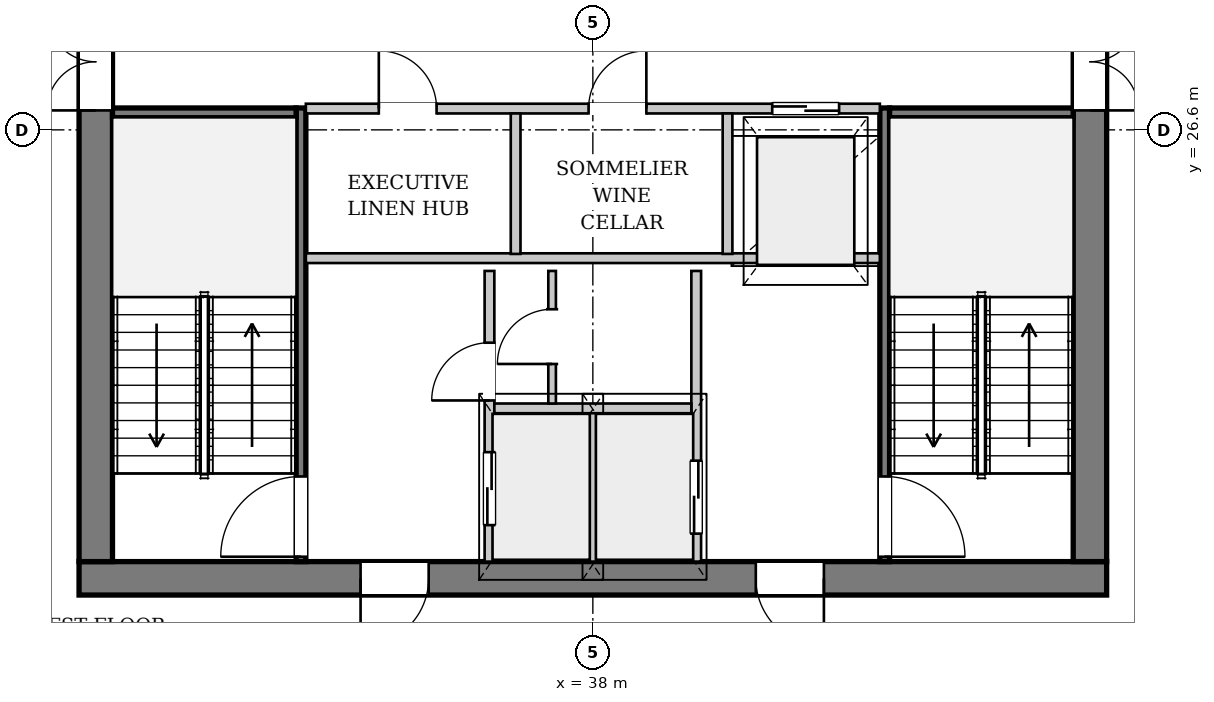
"""IFC4 building model, lengths in metres.
Left out: names, types, materials, properties, quantities, classifications, styles, units other than length and angle.
Written with IfcOpenShell. Run it as: python <this file> out.ifc"""

import sys

from ifc_helpers import new_model, si_unit, direction, frame, frame_2d, origin, place, context, subcontext, project, spatial, rectangle, extrude, source, transform, mapped, element, fill, save


model = new_model("IFC4")
c1 = context("Model", 3, precision=1e-05, world=origin(), true_north=direction((0.0, 1.0)))
c2 = subcontext(c1, "Body", "Model", "MODEL_VIEW")
j1 = project(units=[si_unit("LENGTHUNIT", "METRE"), si_unit("PLANEANGLEUNIT", "RADIAN")], contexts=[c1])
p1 = place(None, origin())
s1 = spatial("IfcSite", under=j1, at=p1, CompositionType="ELEMENT")
p2 = place(p1, origin())
s2 = spatial("IfcBuilding", under=s1, at=p2, CompositionType="ELEMENT")
p3 = place(p2, frame((0.0, 0.0, 178.55)))
s3 = spatial("IfcBuildingStorey", under=s2, at=p3, CompositionType="ELEMENT", Elevation=178.55)
p4 = place(p3, frame((53.023, 21.021, 0.0), z_axis=(0.0, 0.0, 1.0), x_axis=(-0.61594757216, -0.787787146601, 0.0)))
e1 = element("IfcWall", 1, at=p4, inside=s3, PredefinedType="SOLIDWALL", context=c2, shape_type="SweptSolid", body=[
    extrude(rectangle(XDim=23.347, YDim=0.32, at=frame_2d((11.674, 0.0))), origin(), (0.0, 0.0, 1.0), 2.722),
])
p5 = place(p4, frame((6.271, 0.0, 0.0)))
e2 = element("IfcOpeningElement", 2, at=p5, cuts=e1, PredefinedType="OPENING", context=c2, shape_type="SweptSolid", body=[
    extrude(rectangle(XDim=1.5, YDim=2.3, at=frame_2d((0.75, 1.15))), frame((0.0, 0.17, 0.0), z_axis=(0.0, -1.0, 0.0), x_axis=(1.0, 0.0, 0.0)), (0.0, 0.0, 1.0), 0.34),
])
p6 = place(p4, frame((15.977, 0.0, 0.252)))
e3 = element("IfcOpeningElement", 3, at=p6, cuts=e1, PredefinedType="OPENING", context=c2, shape_type="SweptSolid", body=[
    extrude(rectangle(XDim=2.6, YDim=2.35, at=frame_2d((1.3, 1.175))), frame((0.0, 0.17, 0.0), z_axis=(0.0, -1.0, 0.0), x_axis=(1.0, 0.0, 0.0)), (0.0, 0.0, 1.0), 0.34),
])
p7 = place(p3, frame((46.45, 19.225, 0.0), z_axis=(0.0, 0.0, 1.0), x_axis=(-1.0, 0.0, 0.0)))
e4 = element("IfcWall", 4, at=p7, inside=s3, PredefinedType="SHEAR", context=c2, shape_type="SweptSolid", body=[
    extrude(rectangle(XDim=16.9, YDim=0.55, at=frame_2d((8.45, 0.0))), origin(), (0.0, 0.0, 1.0), 3.33),
])
p8 = place(p7, frame((4.65, 0.0, 0.0)))
e5 = element("IfcOpeningElement", 5, at=p8, cuts=e4, PredefinedType="OPENING", context=c2, shape_type="SweptSolid", body=[
    extrude(rectangle(XDim=1.12, YDim=2.25, at=frame_2d((0.56, 1.125))), frame((0.0, 0.285, 0.0), z_axis=(0.0, -1.0, 0.0), x_axis=(1.0, 0.0, 0.0)), (0.0, 0.0, 1.0), 0.57),
])
p9 = place(p7, frame((11.15, 0.0, 0.0)))
e6 = element("IfcOpeningElement", 6, at=p9, cuts=e4, PredefinedType="OPENING", context=c2, shape_type="SweptSolid", body=[
    extrude(rectangle(XDim=1.12, YDim=2.25, at=frame_2d((0.56, 1.125))), frame((0.0, 0.285, 0.0), z_axis=(0.0, -1.0, 0.0), x_axis=(1.0, 0.0, 0.0)), (0.0, 0.0, 1.0), 0.57),
])
p10 = place(p3, frame((29.825, 19.5, 0.0), z_axis=(0.0, 0.0, 1.0), x_axis=(0.0, 1.0, 0.0)))
e7 = element("IfcWall", 7, at=p10, inside=s3, PredefinedType="SHEAR", context=c2, shape_type="SweptSolid", body=[
    extrude(rectangle(XDim=14.2, YDim=0.55, at=frame_2d((7.1, 0.0))), origin(), (0.0, 0.0, 1.0), 3.33),
])
p11 = place(p10, frame((7.42, 0.0, 0.0)))
e8 = element("IfcOpeningElement", 8, at=p11, cuts=e7, PredefinedType="OPENING", context=c2, shape_type="SweptSolid", body=[
    extrude(rectangle(XDim=1.6, YDim=2.2, at=frame_2d((0.8, 1.1))), frame((0.0, 0.285, 0.0), z_axis=(0.0, -1.0, 0.0), x_axis=(1.0, 0.0, 0.0)), (0.0, 0.0, 1.0), 0.57),
])
p12 = place(p3, frame((46.175, 33.7, 0.0), z_axis=(0.0, 0.0, 1.0), x_axis=(0.0, -1.0, 0.0)))
e9 = element("IfcWall", 9, at=p12, inside=s3, PredefinedType="SHEAR", context=c2, shape_type="SweptSolid", body=[
    extrude(rectangle(XDim=14.2, YDim=0.55, at=frame_2d((7.1, 0.0))), origin(), (0.0, 0.0, 1.0), 3.33),
])
p13 = place(p12, frame((5.18, 0.0, 0.0)))
e10 = element("IfcOpeningElement", 10, at=p13, cuts=e9, PredefinedType="OPENING", context=c2, shape_type="SweptSolid", body=[
    extrude(rectangle(XDim=1.6, YDim=2.2, at=frame_2d((0.8, 1.1))), frame((0.0, 0.285, 0.0), z_axis=(0.0, -1.0, 0.0), x_axis=(1.0, 0.0, 0.0)), (0.0, 0.0, 1.0), 0.57),
])
p14 = place(p12, frame((2.05, 0.0, 0.0)))
e11 = element("IfcOpeningElement", 11, at=p14, cuts=e9, PredefinedType="OPENING", context=c2, shape_type="SweptSolid", body=[
    extrude(rectangle(XDim=0.95, YDim=2.1, at=frame_2d((0.475, 1.05))), frame((0.0, 0.285, 0.0), z_axis=(0.0, -1.0, 0.0), x_axis=(1.0, 0.0, 0.0)), (0.0, 0.0, 1.0), 0.57),
])
p15 = place(p3, frame((33.2, 19.5, 0.0), z_axis=(0.0, 0.0, 1.0), x_axis=(0.0, 1.0, 0.0)))
e12 = element("IfcWall", 12, at=p15, inside=s3, PredefinedType="PARTITIONING", context=c2, shape_type="SweptSolid", body=[
    extrude(rectangle(XDim=7.46, YDim=0.16, at=frame_2d((3.73, 0.0))), origin(), (0.0, 0.0, 1.0), 3.33),
])
p16 = place(p15, frame((0.08, 0.0, 0.0)))
e13 = element("IfcOpeningElement", 13, at=p16, cuts=e12, PredefinedType="OPENING", context=c2, shape_type="SweptSolid", body=[
    extrude(rectangle(XDim=1.32, YDim=2.2, at=frame_2d((0.66, 1.1))), frame((0.0, 0.09, 0.0), z_axis=(0.0, -1.0, 0.0), x_axis=(1.0, 0.0, 0.0)), (0.0, 0.0, 1.0), 0.18),
])
p17 = place(p3, frame((30.1, 26.88, 0.0), z_axis=(0.0, 0.0, 1.0), x_axis=(1.0, 0.0, 0.0)))
e14 = element("IfcWall", 14, at=p17, inside=s3, PredefinedType="PARTITIONING", context=c2, shape_type="SweptSolid", body=[
    extrude(rectangle(XDim=3.02, YDim=0.16, at=frame_2d((1.51, 0.0))), origin(), (0.0, 0.0, 1.0), 3.33),
])
p18 = place(p3, frame((42.8, 26.96, 0.0), z_axis=(0.0, 0.0, 1.0), x_axis=(0.0, -1.0, 0.0)))
e15 = element("IfcWall", 15, at=p18, inside=s3, PredefinedType="PARTITIONING", context=c2, shape_type="SweptSolid", body=[
    extrude(rectangle(XDim=7.46, YDim=0.16, at=frame_2d((3.73, 0.0))), origin(), (0.0, 0.0, 1.0), 3.33),
])
p19 = place(p18, frame((6.06, 0.0, 0.0)))
e16 = element("IfcOpeningElement", 16, at=p19, cuts=e15, PredefinedType="OPENING", context=c2, shape_type="SweptSolid", body=[
    extrude(rectangle(XDim=1.32, YDim=2.2, at=frame_2d((0.66, 1.1))), frame((0.0, 0.09, 0.0), z_axis=(0.0, -1.0, 0.0), x_axis=(1.0, 0.0, 0.0)), (0.0, 0.0, 1.0), 0.18),
])
p20 = place(p3, frame((42.88, 26.88, 0.0), z_axis=(0.0, 0.0, 1.0), x_axis=(1.0, 0.0, 0.0)))
e17 = element("IfcWall", 17, at=p20, inside=s3, PredefinedType="PARTITIONING", context=c2, shape_type="SweptSolid", body=[
    extrude(rectangle(XDim=3.02, YDim=0.16, at=frame_2d((1.51, 0.0))), origin(), (0.0, 0.0, 1.0), 3.33),
])
p21 = place(p3, frame((36.3, 19.5, 0.0), z_axis=(0.0, 0.0, 1.0), x_axis=(0.0, 1.0, 0.0)))
e18 = element("IfcWall", 18, at=p21, inside=s3, PredefinedType="PARTITIONING", context=c2, shape_type="SweptSolid", body=[
    extrude(rectangle(XDim=4.78, YDim=0.16, at=frame_2d((2.39, 0.0))), origin(), (0.0, 0.0, 1.0), 3.33),
])
p22 = place(p21, frame((0.6, 0.0, 0.0)))
e19 = element("IfcOpeningElement", 19, at=p22, cuts=e18, PredefinedType="OPENING", context=c2, shape_type="SweptSolid", body=[
    extrude(rectangle(XDim=1.2, YDim=2.2, at=frame_2d((0.6, 1.1))), frame((0.0, 0.09, 0.0), z_axis=(0.0, -1.0, 0.0), x_axis=(1.0, 0.0, 0.0)), (0.0, 0.0, 1.0), 0.18),
])
p23 = place(p21, frame((2.65, 0.0, 0.0)))
e20 = element("IfcOpeningElement", 20, at=p23, cuts=e18, PredefinedType="OPENING", context=c2, shape_type="SweptSolid", body=[
    extrude(rectangle(XDim=0.95, YDim=2.1, at=frame_2d((0.475, 1.05))), frame((0.0, 0.09, 0.0), z_axis=(0.0, -1.0, 0.0), x_axis=(1.0, 0.0, 0.0)), (0.0, 0.0, 1.0), 0.18),
])
p24 = place(p3, frame((39.7, 24.28, 0.0), z_axis=(0.0, 0.0, 1.0), x_axis=(0.0, -1.0, 0.0)))
e21 = element("IfcWall", 21, at=p24, inside=s3, PredefinedType="PARTITIONING", context=c2, shape_type="SweptSolid", body=[
    extrude(rectangle(XDim=4.78, YDim=0.16, at=frame_2d((2.39, 0.0))), origin(), (0.0, 0.0, 1.0), 3.33),
])
p25 = place(p24, frame((3.12, 0.0, 0.0)))
e22 = element("IfcOpeningElement", 22, at=p25, cuts=e21, PredefinedType="OPENING", context=c2, shape_type="SweptSolid", body=[
    extrude(rectangle(XDim=1.2, YDim=2.2, at=frame_2d((0.6, 1.1))), frame((0.0, 0.09, 0.0), z_axis=(0.0, -1.0, 0.0), x_axis=(1.0, 0.0, 0.0)), (0.0, 0.0, 1.0), 0.18),
])
p26 = place(p3, frame((38.0, 19.5, 0.0), z_axis=(0.0, 0.0, 1.0), x_axis=(0.0, 1.0, 0.0)))
e23 = element("IfcWall", 23, at=p26, inside=s3, PredefinedType="PARTITIONING", context=c2, shape_type="SweptSolid", body=[
    extrude(rectangle(XDim=2.46, YDim=0.125, at=frame_2d((1.23, 0.0))), origin(), (0.0, 0.0, 1.0), 3.33),
])
p27 = place(p3, frame((36.38, 22.02, 0.0), z_axis=(0.0, 0.0, 1.0), x_axis=(1.0, 0.0, 0.0)))
e24 = element("IfcWall", 24, at=p27, inside=s3, PredefinedType="PARTITIONING", context=c2, shape_type="SweptSolid", body=[
    extrude(rectangle(XDim=3.24, YDim=0.16, at=frame_2d((1.62, 0.0))), origin(), (0.0, 0.0, 1.0), 3.33),
])
p28 = place(p3, frame((33.28, 24.49, 0.0), z_axis=(0.0, 0.0, 1.0), x_axis=(1.0, 0.0, 0.0)))
e25 = element("IfcWall", 25, at=p28, inside=s3, PredefinedType="PARTITIONING", context=c2, shape_type="SweptSolid", body=[
    extrude(rectangle(XDim=9.44, YDim=0.16, at=frame_2d((4.72, 0.0))), origin(), (0.0, 0.0, 1.0), 3.33),
])
p29 = place(p3, frame((37.33, 22.1, 0.0), z_axis=(0.0, 0.0, 1.0), x_axis=(0.0, 1.0, 0.0)))
e26 = element("IfcWall", 26, at=p29, inside=s3, PredefinedType="PARTITIONING", context=c2, shape_type="SweptSolid", body=[
    extrude(rectangle(XDim=2.18, YDim=0.125, at=frame_2d((1.09, 0.0))), origin(), (0.0, 0.0, 1.0), 3.33),
])
p30 = place(p29, frame((0.65, 0.0, 0.0)))
e27 = element("IfcOpeningElement", 27, at=p30, cuts=e26, PredefinedType="OPENING", context=c2, shape_type="SweptSolid", body=[
    extrude(rectangle(XDim=0.9, YDim=2.1, at=frame_2d((0.45, 1.05))), frame((0.0, 0.073, 0.0), z_axis=(0.0, -1.0, 0.0), x_axis=(1.0, 0.0, 0.0)), (0.0, 0.0, 1.0), 0.145),
])
p31 = place(p3, frame((33.28, 26.95, 0.0), z_axis=(0.0, 0.0, 1.0), x_axis=(1.0, 0.0, 0.0)))
e28 = element("IfcWall", 28, at=p31, inside=s3, PredefinedType="PARTITIONING", context=c2, shape_type="SweptSolid", body=[
    extrude(rectangle(XDim=9.44, YDim=0.16, at=frame_2d((4.72, 0.0))), origin(), (0.0, 0.0, 1.0), 3.33),
])
p32 = place(p31, frame((1.2, 0.0, 0.0)))
e29 = element("IfcOpeningElement", 29, at=p32, cuts=e28, PredefinedType="OPENING", context=c2, shape_type="SweptSolid", body=[
    extrude(rectangle(XDim=0.95, YDim=2.1, at=frame_2d((0.475, 1.05))), frame((0.0, 0.09, 0.0), z_axis=(0.0, -1.0, 0.0), x_axis=(1.0, 0.0, 0.0)), (0.0, 0.0, 1.0), 0.18),
])
p33 = place(p31, frame((4.65, 0.0, 0.0)))
e30 = element("IfcOpeningElement", 30, at=p33, cuts=e28, PredefinedType="OPENING", context=c2, shape_type="SweptSolid", body=[
    extrude(rectangle(XDim=0.95, YDim=2.1, at=frame_2d((0.475, 1.05))), frame((0.0, 0.09, 0.0), z_axis=(0.0, -1.0, 0.0), x_axis=(1.0, 0.0, 0.0)), (0.0, 0.0, 1.0), 0.18),
])
p34 = place(p31, frame((7.67, 0.0, 0.0)))
e31 = element("IfcOpeningElement", 31, at=p34, cuts=e28, PredefinedType="OPENING", context=c2, shape_type="SweptSolid", body=[
    extrude(rectangle(XDim=1.1, YDim=2.2, at=frame_2d((0.55, 1.1))), frame((0.0, 0.09, 0.0), z_axis=(0.0, -1.0, 0.0), x_axis=(1.0, 0.0, 0.0)), (0.0, 0.0, 1.0), 0.18),
])
for number, where, z_axis, x_axis in (
    (32, (36.73, 24.56, 0.0), (0.0, 0.0, 1.0), (0.0, 1.0, 0.0)),
    (33, (40.215, 24.56, 0.0), (0.0, 0.0, 1.0), (0.0, 1.0, 0.0)),
):
    element("IfcWall", number, at=place(p3, frame(where, z_axis=z_axis, x_axis=x_axis)), inside=s3, PredefinedType="PARTITIONING", context=c2, shape_type="SweptSolid", body=[
        extrude(rectangle(XDim=2.31, YDim=0.16, at=frame_2d((1.155, 0.0))), origin(), (0.0, 0.0, 1.0), 3.33),
    ])
m1 = source(origin(), c2, "Body", "SweptSolid", [
    extrude(rectangle(XDim=1.12, YDim=2.25, at=frame_2d((0.56, 1.125))), frame((0.0, 0.025, 0.0), z_axis=(0.0, -1.0, 0.0), x_axis=(1.0, 0.0, 0.0)), (0.0, 0.0, 1.0), 0.05),
])
p35 = place(p8, origin())
e34 = element("IfcDoor", 34, at=p35, inside=s3, OperationType="SINGLE_SWING_LEFT", PredefinedType="DOOR", context=c2, shape_type="MappedRepresentation", body=[
    mapped(m1, transform((0.0, 0.0, 0.0), x_axis=(1.0, 0.0, 0.0), y_axis=(0.0, 1.0, 0.0), z_axis=(0.0, 0.0, 1.0), scale=1.0)),
])
fill(e5, e34)
p36 = place(p9, origin())
e35 = element("IfcDoor", 35, at=p36, inside=s3, OperationType="SINGLE_SWING_RIGHT", PredefinedType="DOOR", context=c2, shape_type="MappedRepresentation", body=[
    mapped(m1, transform((0.0, 0.0, 0.0), x_axis=(1.0, 0.0, 0.0), y_axis=(0.0, 1.0, 0.0), z_axis=(0.0, 0.0, 1.0), scale=1.0)),
])
fill(e6, e35)
m2 = source(origin(), c2, "Body", "SweptSolid", [
    extrude(rectangle(XDim=1.6, YDim=2.2, at=frame_2d((0.8, 1.1))), frame((0.0, 0.025, 0.0), z_axis=(0.0, -1.0, 0.0), x_axis=(1.0, 0.0, 0.0)), (0.0, 0.0, 1.0), 0.05),
])
p37 = place(p11, origin())
e36 = element("IfcDoor", 36, at=p37, inside=s3, OperationType="DOUBLE_DOOR_SINGLE_SWING", PredefinedType="DOOR", context=c2, shape_type="MappedRepresentation", body=[
    mapped(m2, transform((0.0, 0.0, 0.0), x_axis=(1.0, 0.0, 0.0), y_axis=(0.0, 1.0, 0.0), z_axis=(0.0, 0.0, 1.0), scale=1.0)),
])
fill(e8, e36)
p38 = place(p13, origin())
e37 = element("IfcDoor", 37, at=p38, inside=s3, OperationType="DOUBLE_DOOR_SINGLE_SWING", PredefinedType="DOOR", context=c2, shape_type="MappedRepresentation", body=[
    mapped(m2, transform((0.0, 0.0, 0.0), x_axis=(1.0, 0.0, 0.0), y_axis=(0.0, 1.0, 0.0), z_axis=(0.0, 0.0, 1.0), scale=1.0)),
])
fill(e10, e37)
m3 = source(origin(), c2, "Body", "SweptSolid", [
    extrude(rectangle(XDim=1.32, YDim=2.2, at=frame_2d((0.66, 1.1))), frame((0.0, 0.025, 0.0), z_axis=(0.0, -1.0, 0.0), x_axis=(1.0, 0.0, 0.0)), (0.0, 0.0, 1.0), 0.05),
])
p39 = place(p16, origin())
e38 = element("IfcDoor", 38, at=p39, inside=s3, OperationType="SINGLE_SWING_LEFT", PredefinedType="DOOR", context=c2, shape_type="MappedRepresentation", body=[
    mapped(m3, transform((0.0, 0.0, 0.0), x_axis=(1.0, 0.0, 0.0), y_axis=(0.0, 1.0, 0.0), z_axis=(0.0, 0.0, 1.0), scale=1.0)),
])
fill(e13, e38)
p40 = place(p19, origin())
e39 = element("IfcDoor", 39, at=p40, inside=s3, OperationType="SINGLE_SWING_RIGHT", PredefinedType="DOOR", context=c2, shape_type="MappedRepresentation", body=[
    mapped(m3, transform((0.0, 0.0, 0.0), x_axis=(1.0, 0.0, 0.0), y_axis=(0.0, 1.0, 0.0), z_axis=(0.0, 0.0, 1.0), scale=1.0)),
])
fill(e16, e39)
m4 = source(origin(), c2, "Body", "SweptSolid", [
    extrude(rectangle(XDim=1.2, YDim=2.2, at=frame_2d((0.6, 1.1))), frame((0.0, 0.025, 0.0), z_axis=(0.0, -1.0, 0.0), x_axis=(1.0, 0.0, 0.0)), (0.0, 0.0, 1.0), 0.05),
])
p41 = place(p22, origin())
e40 = element("IfcDoor", 40, at=p41, inside=s3, OperationType="DOUBLE_DOOR_SLIDING", PredefinedType="DOOR", context=c2, shape_type="MappedRepresentation", body=[
    mapped(m4, transform((0.0, 0.0, 0.0), x_axis=(1.0, 0.0, 0.0), y_axis=(0.0, 1.0, 0.0), z_axis=(0.0, 0.0, 1.0), scale=1.0)),
])
fill(e19, e40)
m5 = source(origin(), c2, "Body", "SweptSolid", [
    extrude(rectangle(XDim=0.95, YDim=2.1, at=frame_2d((0.475, 1.05))), frame((0.0, 0.025, 0.0), z_axis=(0.0, -1.0, 0.0), x_axis=(1.0, 0.0, 0.0)), (0.0, 0.0, 1.0), 0.05),
])
p42 = place(p23, origin())
e41 = element("IfcDoor", 41, at=p42, inside=s3, OperationType="SINGLE_SWING_LEFT", PredefinedType="DOOR", context=c2, shape_type="MappedRepresentation", body=[
    mapped(m5, transform((0.0, 0.0, 0.0), x_axis=(1.0, 0.0, 0.0), y_axis=(0.0, 1.0, 0.0), z_axis=(0.0, 0.0, 1.0), scale=1.0)),
])
fill(e20, e41)
m6 = source(origin(), c2, "Body", "SweptSolid", [
    extrude(rectangle(XDim=0.9, YDim=2.1, at=frame_2d((0.45, 1.05))), frame((0.0, 0.025, 0.0), z_axis=(0.0, -1.0, 0.0), x_axis=(1.0, 0.0, 0.0)), (0.0, 0.0, 1.0), 0.05),
])
p43 = place(p30, origin())
e42 = element("IfcDoor", 42, at=p43, inside=s3, OperationType="SINGLE_SWING_LEFT", PredefinedType="DOOR", context=c2, shape_type="MappedRepresentation", body=[
    mapped(m6, transform((0.0, 0.0, 0.0), x_axis=(1.0, 0.0, 0.0), y_axis=(0.0, 1.0, 0.0), z_axis=(0.0, 0.0, 1.0), scale=1.0)),
])
fill(e27, e42)
p44 = place(p25, origin())
e43 = element("IfcDoor", 43, at=p44, inside=s3, OperationType="DOUBLE_DOOR_SLIDING", PredefinedType="DOOR", context=c2, shape_type="MappedRepresentation", body=[
    mapped(m4, transform((0.0, 0.0, 0.0), x_axis=(1.0, 0.0, 0.0), y_axis=(0.0, 1.0, 0.0), z_axis=(0.0, 0.0, 1.0), scale=1.0)),
])
fill(e22, e43)
p45 = place(p32, origin())
e44 = element("IfcDoor", 44, at=p45, inside=s3, OperationType="SINGLE_SWING_LEFT", PredefinedType="DOOR", context=c2, shape_type="MappedRepresentation", body=[
    mapped(m5, transform((0.0, 0.0, 0.0), x_axis=(1.0, 0.0, 0.0), y_axis=(0.0, 1.0, 0.0), z_axis=(0.0, 0.0, 1.0), scale=1.0)),
])
fill(e29, e44)
p46 = place(p33, origin())
e45 = element("IfcDoor", 45, at=p46, inside=s3, OperationType="SINGLE_SWING_RIGHT", PredefinedType="DOOR", context=c2, shape_type="MappedRepresentation", body=[
    mapped(m5, transform((0.0, 0.0, 0.0), x_axis=(1.0, 0.0, 0.0), y_axis=(0.0, 1.0, 0.0), z_axis=(0.0, 0.0, 1.0), scale=1.0)),
])
fill(e30, e45)
m7 = source(origin(), c2, "Body", "SweptSolid", [
    extrude(rectangle(XDim=1.1, YDim=2.2, at=frame_2d((0.55, 1.1))), frame((0.0, 0.025, 0.0), z_axis=(0.0, -1.0, 0.0), x_axis=(1.0, 0.0, 0.0)), (0.0, 0.0, 1.0), 0.05),
])
p47 = place(p34, origin())
e46 = element("IfcDoor", 46, at=p47, inside=s3, OperationType="DOUBLE_DOOR_SLIDING", PredefinedType="DOOR", context=c2, shape_type="MappedRepresentation", body=[
    mapped(m7, transform((0.0, 0.0, 0.0), x_axis=(1.0, 0.0, 0.0), y_axis=(0.0, 1.0, 0.0), z_axis=(0.0, 0.0, 1.0), scale=1.0)),
])
fill(e31, e46)
save(model, sys.argv[1])
